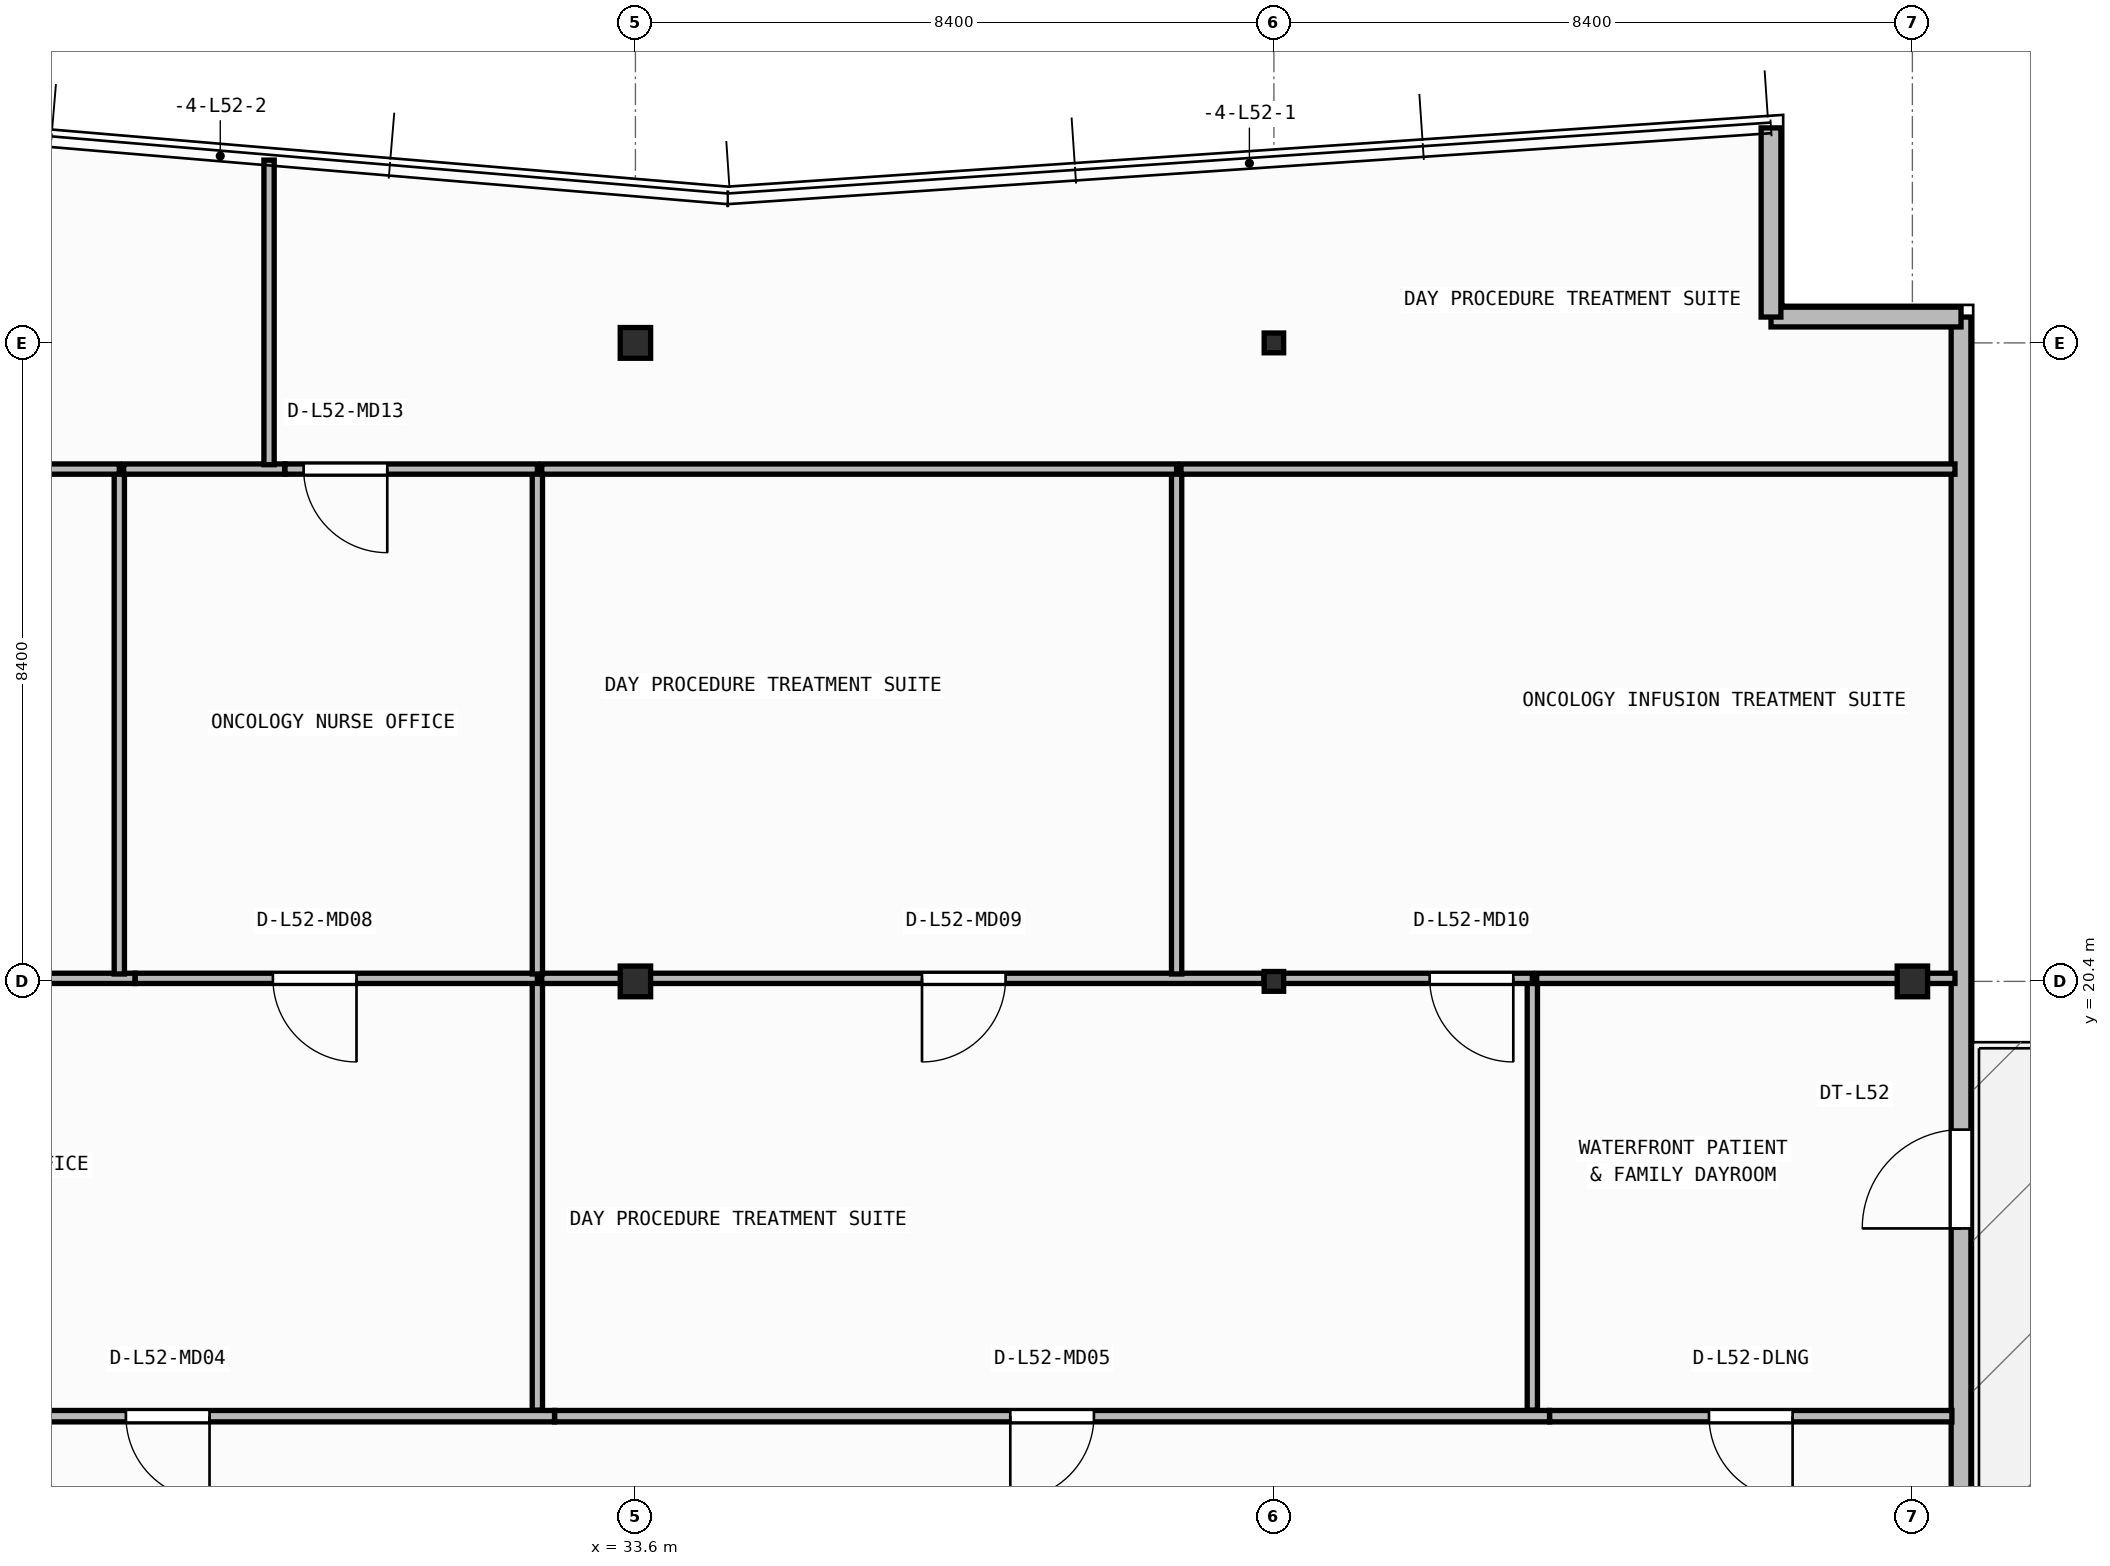
"""IFC4 building model, lengths in metres.
Left out: names, types, materials, properties, quantities, classifications, styles, units other than length and angle.
Written with IfcOpenShell. Run it as: python <this file> out.ifc"""

import sys

from ifc_helpers import new_model, si_unit, direction, frame, frame_2d, origin, origin_2d, place, context, subcontext, project, spatial, rectangle, i_section, extrude, element, fill, save


model = new_model("IFC4")
c1 = context("Model", 3, precision=1e-05, world=origin(), true_north=direction((0.0, 1.0)))
c2 = subcontext(c1, "Body", "Model", "MODEL_VIEW")
j1 = project(units=[si_unit("LENGTHUNIT", "METRE"), si_unit("PLANEANGLEUNIT", "RADIAN")], contexts=[c1])
p1 = place(None, origin())
s1 = spatial("IfcSite", under=j1, at=p1, CompositionType="ELEMENT")
p2 = place(p1, origin())
s2 = spatial("IfcBuilding", under=s1, at=p2, CompositionType="ELEMENT")
p3 = place(p2, frame((0.0, 0.0, 211.85)))
s3 = spatial("IfcBuildingStorey", under=s2, at=p3, CompositionType="ELEMENT", Elevation=211.85)
p4 = place(p3, frame((33.6, 20.4, 0.0), z_axis=(0.0, 0.0, 1.0), x_axis=(1.0, 0.0, 0.0)))
e1 = element("IfcColumn", 1, at=p4, inside=s3, PredefinedType="COLUMN", context=c2, shape_type="SweptSolid", body=[
    extrude(i_section(OverallWidth=0.4, OverallDepth=0.404, WebThickness=0.02, FlangeThickness=0.032, at=origin_2d()), origin(), (0.0, 0.0, 1.0), 3.95),
])
p5 = place(p3, frame((42.0, 20.4, 0.0), z_axis=(0.0, 0.0, 1.0), x_axis=(1.0, 0.0, 0.0)))
e2 = element("IfcColumn", 2, at=p5, inside=s3, PredefinedType="COLUMN", context=c2, shape_type="SweptSolid", body=[
    extrude(i_section(OverallWidth=0.256, OverallDepth=0.26, WebThickness=0.01, FlangeThickness=0.017, FilletRadius=0.013, at=origin_2d()), origin(), (0.0, 0.0, 1.0), 3.95),
])
for number, where, z_axis, x_axis in (
    (3, (50.4, 20.4, 0.0), (0.0, 0.0, 1.0), (1.0, 0.0, 0.0)),
    (4, (33.6, 28.8, 0.0), (0.0, 0.0, 1.0), (1.0, 0.0, 0.0)),
):
    element("IfcColumn", number, at=place(p3, frame(where, z_axis=z_axis, x_axis=x_axis)), inside=s3, PredefinedType="COLUMN", context=c2, shape_type="SweptSolid", body=[
        extrude(i_section(OverallWidth=0.4, OverallDepth=0.404, WebThickness=0.02, FlangeThickness=0.032, at=origin_2d()), origin(), (0.0, 0.0, 1.0), 3.95),
    ])
p6 = place(p3, frame((42.0, 28.8, 0.0), z_axis=(0.0, 0.0, 1.0), x_axis=(1.0, 0.0, 0.0)))
e5 = element("IfcColumn", 5, at=p6, inside=s3, PredefinedType="COLUMN", context=c2, shape_type="SweptSolid", body=[
    extrude(i_section(OverallWidth=0.256, OverallDepth=0.26, WebThickness=0.01, FlangeThickness=0.017, FilletRadius=0.013, at=origin_2d()), origin(), (0.0, 0.0, 1.0), 3.95),
])
p7 = place(p3, frame((51.04, 6.46, 0.0), z_axis=(0.0, 0.0, 1.0), x_axis=(0.0, 1.0, 0.0)))
e6 = element("IfcWall", 6, at=p7, inside=s3, PredefinedType="STANDARD", context=c2, shape_type="SweptSolid", body=[
    extrude(rectangle(XDim=22.68, YDim=0.26, at=frame_2d((11.34, 0.0))), origin(), (0.0, 0.0, 1.0), 3.71),
])
p8 = place(p7, frame((10.69, 0.0, 0.0)))
e7 = element("IfcOpeningElement", 7, at=p8, cuts=e6, PredefinedType="OPENING", context=c2, shape_type="SweptSolid", body=[
    extrude(rectangle(XDim=1.3, YDim=2.15, at=frame_2d((0.65, 1.075))), frame((0.0, 0.14, 0.0), z_axis=(0.0, -1.0, 0.0), x_axis=(1.0, 0.0, 0.0)), (0.0, 0.0, 1.0), 0.28),
])
p9 = place(p3, frame((51.04, 29.14, 0.0), z_axis=(0.0, 0.0, 1.0), x_axis=(-1.0, 0.0, 0.0)))
e8 = element("IfcWall", 8, at=p9, inside=s3, PredefinedType="STANDARD", context=c2, shape_type="SweptSolid", body=[
    extrude(rectangle(XDim=2.5, YDim=0.26, at=frame_2d((1.25, 0.0))), origin(), (0.0, 0.0, 1.0), 3.71),
])
p10 = place(p3, frame((48.54, 29.14, 0.0), z_axis=(0.0, 0.0, 1.0), x_axis=(0.0, 1.0, 0.0)))
e9 = element("IfcWall", 9, at=p10, inside=s3, PredefinedType="STANDARD", context=c2, shape_type="SweptSolid", body=[
    extrude(rectangle(XDim=2.489, YDim=0.26, at=frame_2d((1.245, 0.0))), origin(), (0.0, 0.0, 1.0), 3.71),
])
p11 = place(p3, frame((32.536, 14.68, 0.0), z_axis=(0.0, 0.0, 1.0), x_axis=(-1.0, 0.0, 0.0)))
e10 = element("IfcWall", 10, at=p11, inside=s3, PredefinedType="PARTITIONING", context=c2, shape_type="SweptSolid", body=[
    extrude(rectangle(XDim=10.178, YDim=0.15, at=frame_2d((5.089, 0.0))), origin(), (0.0, 0.0, 1.0), 3.71),
])
p12 = place(p11, frame((4.539, 0.0, 0.0)))
e11 = element("IfcOpeningElement", 11, at=p12, cuts=e10, PredefinedType="OPENING", context=c2, shape_type="SweptSolid", body=[
    extrude(rectangle(XDim=1.1, YDim=2.1, at=frame_2d((0.55, 1.05))), frame((0.0, 0.085, 0.0), z_axis=(0.0, -1.0, 0.0), x_axis=(1.0, 0.0, 0.0)), (0.0, 0.0, 1.0), 0.17),
])
p13 = place(p3, frame((45.626, 14.68, 0.0), z_axis=(0.0, 0.0, 1.0), x_axis=(-1.0, 0.0, 0.0)))
e12 = element("IfcWall", 12, at=p13, inside=s3, PredefinedType="PARTITIONING", context=c2, shape_type="SweptSolid", body=[
    extrude(rectangle(XDim=13.088, YDim=0.15, at=frame_2d((6.544, 0.0))), origin(), (0.0, 0.0, 1.0), 3.71),
])
p14 = place(p13, frame((5.994, 0.0, 0.0)))
e13 = element("IfcOpeningElement", 13, at=p14, cuts=e12, PredefinedType="OPENING", context=c2, shape_type="SweptSolid", body=[
    extrude(rectangle(XDim=1.1, YDim=2.1, at=frame_2d((0.55, 1.05))), frame((0.0, 0.085, 0.0), z_axis=(0.0, -1.0, 0.0), x_axis=(1.0, 0.0, 0.0)), (0.0, 0.0, 1.0), 0.17),
])
p15 = place(p3, frame((50.92, 14.68, 0.0), z_axis=(0.0, 0.0, 1.0), x_axis=(-1.0, 0.0, 0.0)))
e14 = element("IfcWall", 14, at=p15, inside=s3, PredefinedType="PARTITIONING", context=c2, shape_type="SweptSolid", body=[
    extrude(rectangle(XDim=5.292, YDim=0.15, at=frame_2d((2.646, 0.0))), origin(), (0.0, 0.0, 1.0), 3.71),
])
p16 = place(p15, frame((2.096, 0.0, 0.0)))
e15 = element("IfcOpeningElement", 15, at=p16, cuts=e14, PredefinedType="OPENING", context=c2, shape_type="SweptSolid", body=[
    extrude(rectangle(XDim=1.1, YDim=2.1, at=frame_2d((0.55, 1.05))), frame((0.0, 0.085, 0.0), z_axis=(0.0, -1.0, 0.0), x_axis=(1.0, 0.0, 0.0)), (0.0, 0.0, 1.0), 0.17),
])
p17 = place(p3, frame((32.31, 14.76, 0.0), z_axis=(0.0, 0.0, 1.0), x_axis=(0.0, 1.0, 0.0)))
e16 = element("IfcWall", 16, at=p17, inside=s3, PredefinedType="PARTITIONING", context=c2, shape_type="SweptSolid", body=[
    extrude(rectangle(XDim=5.68, YDim=0.135, at=frame_2d((2.84, 0.0))), origin(), (0.0, 0.0, 1.0), 3.71),
])
p18 = place(p3, frame((27.018, 20.44, 0.0), z_axis=(0.0, 0.0, 1.0), x_axis=(-1.0, 0.0, 0.0)))
e17 = element("IfcWall", 17, at=p18, inside=s3, PredefinedType="PARTITIONING", context=c2, shape_type="SweptSolid", body=[
    extrude(rectangle(XDim=4.83, YDim=0.135, at=frame_2d((2.415, 0.0))), origin(), (0.0, 0.0, 1.0), 3.152),
])
p19 = place(p3, frame((32.31, 20.44, 0.0), z_axis=(0.0, 0.0, 1.0), x_axis=(-1.0, 0.0, 0.0)))
e18 = element("IfcWall", 18, at=p19, inside=s3, PredefinedType="PARTITIONING", context=c2, shape_type="SweptSolid", body=[
    extrude(rectangle(XDim=5.291, YDim=0.135, at=frame_2d((2.645, 0.0))), origin(), (0.0, 0.0, 1.0), 3.152),
])
p20 = place(p19, frame((2.379, 0.0, 0.0)))
e19 = element("IfcOpeningElement", 19, at=p20, cuts=e18, PredefinedType="OPENING", context=c2, shape_type="SweptSolid", body=[
    extrude(rectangle(XDim=1.1, YDim=2.1, at=frame_2d((0.55, 1.05))), frame((0.0, 0.077, 0.0), z_axis=(0.0, -1.0, 0.0), x_axis=(1.0, 0.0, 0.0)), (0.0, 0.0, 1.0), 0.155),
])
p21 = place(p3, frame((45.4, 14.76, 0.0), z_axis=(0.0, 0.0, 1.0), x_axis=(0.0, 1.0, 0.0)))
e20 = element("IfcWall", 20, at=p21, inside=s3, PredefinedType="PARTITIONING", context=c2, shape_type="SweptSolid", body=[
    extrude(rectangle(XDim=5.68, YDim=0.135, at=frame_2d((2.84, 0.0))), origin(), (0.0, 0.0, 1.0), 3.71),
])
p22 = place(p3, frame((41.872, 20.44, 0.0), z_axis=(0.0, 0.0, 1.0), x_axis=(-1.0, 0.0, 0.0)))
e21 = element("IfcWall", 21, at=p22, inside=s3, PredefinedType="PARTITIONING", context=c2, shape_type="SweptSolid", body=[
    extrude(rectangle(XDim=9.505, YDim=0.135, at=frame_2d((4.752, 0.0))), origin(), (0.0, 0.0, 1.0), 3.152),
])
p23 = place(p22, frame((3.402, 0.0, 0.0)))
e22 = element("IfcOpeningElement", 22, at=p23, cuts=e21, PredefinedType="OPENING", context=c2, shape_type="SweptSolid", body=[
    extrude(rectangle(XDim=1.1, YDim=2.1, at=frame_2d((0.55, 1.05))), frame((0.0, 0.077, 0.0), z_axis=(0.0, -1.0, 0.0), x_axis=(1.0, 0.0, 0.0)), (0.0, 0.0, 1.0), 0.155),
])
p24 = place(p3, frame((45.4, 20.44, 0.0), z_axis=(0.0, 0.0, 1.0), x_axis=(-1.0, 0.0, 0.0)))
e23 = element("IfcWall", 23, at=p24, inside=s3, PredefinedType="PARTITIONING", context=c2, shape_type="SweptSolid", body=[
    extrude(rectangle(XDim=3.526, YDim=0.135, at=frame_2d((1.763, 0.0))), origin(), (0.0, 0.0, 1.0), 3.152),
])
p25 = place(p24, frame((0.25, 0.0, 0.0)))
e24 = element("IfcOpeningElement", 24, at=p25, cuts=e23, PredefinedType="OPENING", context=c2, shape_type="SweptSolid", body=[
    extrude(rectangle(XDim=1.1, YDim=2.1, at=frame_2d((0.55, 1.05))), frame((0.0, 0.077, 0.0), z_axis=(0.0, -1.0, 0.0), x_axis=(1.0, 0.0, 0.0)), (0.0, 0.0, 1.0), 0.155),
])
p26 = place(p3, frame((50.96, 20.44, 0.0), z_axis=(0.0, 0.0, 1.0), x_axis=(-1.0, 0.0, 0.0)))
e25 = element("IfcWall", 25, at=p26, inside=s3, PredefinedType="PARTITIONING", context=c2, shape_type="SweptSolid", body=[
    extrude(rectangle(XDim=5.502, YDim=0.135, at=frame_2d((2.751, 0.0))), origin(), (0.0, 0.0, 1.0), 3.152),
])
p27 = place(p3, frame((26.81, 20.498, 0.0), z_axis=(0.0, 0.0, 1.0), x_axis=(0.0, 1.0, 0.0)))
e26 = element("IfcWall", 26, at=p27, inside=s3, PredefinedType="PARTITIONING", context=c2, shape_type="SweptSolid", body=[
    extrude(rectangle(XDim=6.642, YDim=0.135, at=frame_2d((3.321, 0.0))), origin(), (0.0, 0.0, 1.0), 3.71),
])
p28 = place(p3, frame((26.81, 27.14, 0.0), z_axis=(0.0, 0.0, 1.0), x_axis=(-1.0, 0.0, 0.0)))
e27 = element("IfcWall", 27, at=p28, inside=s3, PredefinedType="PARTITIONING", context=c2, shape_type="SweptSolid", body=[
    extrude(rectangle(XDim=13.03, YDim=0.135, at=frame_2d((6.515, 0.0))), origin(), (0.0, 0.0, 1.0), 3.71),
])
p29 = place(p28, frame((5.1, 0.0, 0.0)))
e28 = element("IfcOpeningElement", 28, at=p29, cuts=e27, PredefinedType="OPENING", context=c2, shape_type="SweptSolid", body=[
    extrude(rectangle(XDim=1.1, YDim=2.1, at=frame_2d((0.55, 1.05))), frame((0.0, 0.077, 0.0), z_axis=(0.0, -1.0, 0.0), x_axis=(1.0, 0.0, 0.0)), (0.0, 0.0, 1.0), 0.155),
])
p30 = place(p3, frame((32.31, 20.498, 0.0), z_axis=(0.0, 0.0, 1.0), x_axis=(0.0, 1.0, 0.0)))
e29 = element("IfcWall", 29, at=p30, inside=s3, PredefinedType="PARTITIONING", context=c2, shape_type="SweptSolid", body=[
    extrude(rectangle(XDim=6.642, YDim=0.135, at=frame_2d((3.321, 0.0))), origin(), (0.0, 0.0, 1.0), 3.71),
])
p31 = place(p3, frame((28.988, 27.14, 0.0), z_axis=(0.0, 0.0, 1.0), x_axis=(-1.0, 0.0, 0.0)))
e30 = element("IfcWall", 30, at=p31, inside=s3, PredefinedType="PARTITIONING", context=c2, shape_type="SweptSolid", body=[
    extrude(rectangle(XDim=2.12, YDim=0.135, at=frame_2d((1.06, 0.0))), origin(), (0.0, 0.0, 1.0), 3.71),
])
p32 = place(p3, frame((32.31, 27.14, 0.0), z_axis=(0.0, 0.0, 1.0), x_axis=(-1.0, 0.0, 0.0)))
e31 = element("IfcWall", 31, at=p32, inside=s3, PredefinedType="PARTITIONING", context=c2, shape_type="SweptSolid", body=[
    extrude(rectangle(XDim=3.321, YDim=0.135, at=frame_2d((1.66, 0.0))), origin(), (0.0, 0.0, 1.0), 3.71),
])
p33 = place(p32, frame((1.975, 0.0, 0.0)))
e32 = element("IfcOpeningElement", 32, at=p33, cuts=e31, PredefinedType="OPENING", context=c2, shape_type="SweptSolid", body=[
    extrude(rectangle(XDim=1.1, YDim=2.1, at=frame_2d((0.55, 1.05))), frame((0.0, 0.077, 0.0), z_axis=(0.0, -1.0, 0.0), x_axis=(1.0, 0.0, 0.0)), (0.0, 0.0, 1.0), 0.155),
])
p34 = place(p3, frame((40.72, 20.498, 0.0), z_axis=(0.0, 0.0, 1.0), x_axis=(0.0, 1.0, 0.0)))
e33 = element("IfcWall", 33, at=p34, inside=s3, PredefinedType="PARTITIONING", context=c2, shape_type="SweptSolid", body=[
    extrude(rectangle(XDim=6.642, YDim=0.135, at=frame_2d((3.321, 0.0))), origin(), (0.0, 0.0, 1.0), 3.71),
])
p35 = place(p3, frame((40.72, 27.14, 0.0), z_axis=(0.0, 0.0, 1.0), x_axis=(-1.0, 0.0, 0.0)))
e34 = element("IfcWall", 34, at=p35, inside=s3, PredefinedType="PARTITIONING", context=c2, shape_type="SweptSolid", body=[
    extrude(rectangle(XDim=8.353, YDim=0.135, at=frame_2d((4.176, 0.0))), origin(), (0.0, 0.0, 1.0), 3.71),
])
p36 = place(p3, frame((50.96, 27.14, 0.0), z_axis=(0.0, 0.0, 1.0), x_axis=(-1.0, 0.0, 0.0)))
e35 = element("IfcWall", 35, at=p36, inside=s3, PredefinedType="PARTITIONING", context=c2, shape_type="SweptSolid", body=[
    extrude(rectangle(XDim=10.182, YDim=0.135, at=frame_2d((5.091, 0.0))), origin(), (0.0, 0.0, 1.0), 3.71),
])
p37 = place(p3, frame((28.78, 27.198, 0.0), z_axis=(0.0, 0.0, 1.0), x_axis=(0.0, 1.0, 0.0)))
e36 = element("IfcWall", 36, at=p37, inside=s3, PredefinedType="PARTITIONING", context=c2, shape_type="SweptSolid", body=[
    extrude(rectangle(XDim=4.008, YDim=0.135, at=frame_2d((2.004, 0.0))), origin(), (0.0, 0.0, 1.0), 3.71),
])
p38 = place(p8, origin())
e37 = element("IfcDoor", 37, at=p38, inside=s3, OperationType="SINGLE_SWING_LEFT", PredefinedType="DOOR", context=c2, shape_type="SweptSolid", body=[
    extrude(rectangle(XDim=1.3, YDim=2.15, at=frame_2d((0.65, 1.075))), frame((0.0, 0.025, 0.0), z_axis=(0.0, -1.0, 0.0), x_axis=(1.0, 0.0, 0.0)), (0.0, 0.0, 1.0), 0.05),
])
fill(e7, e37)
p39 = place(p12, origin())
e38 = element("IfcDoor", 38, at=p39, inside=s3, OperationType="SINGLE_SWING_LEFT", PredefinedType="DOOR", context=c2, shape_type="SweptSolid", body=[
    extrude(rectangle(XDim=1.1, YDim=2.1, at=frame_2d((0.55, 1.05))), frame((0.0, 0.025, 0.0), z_axis=(0.0, -1.0, 0.0), x_axis=(1.0, 0.0, 0.0)), (0.0, 0.0, 1.0), 0.05),
])
fill(e11, e38)
p40 = place(p14, origin())
e39 = element("IfcDoor", 39, at=p40, inside=s3, OperationType="SINGLE_SWING_RIGHT", PredefinedType="DOOR", context=c2, shape_type="SweptSolid", body=[
    extrude(rectangle(XDim=1.1, YDim=2.1, at=frame_2d((0.55, 1.05))), frame((0.0, 0.025, 0.0), z_axis=(0.0, -1.0, 0.0), x_axis=(1.0, 0.0, 0.0)), (0.0, 0.0, 1.0), 0.05),
])
fill(e13, e39)
p41 = place(p16, origin())
e40 = element("IfcDoor", 40, at=p41, inside=s3, OperationType="SINGLE_SWING_LEFT", PredefinedType="DOOR", context=c2, shape_type="SweptSolid", body=[
    extrude(rectangle(XDim=1.1, YDim=2.1, at=frame_2d((0.55, 1.05))), frame((0.0, 0.025, 0.0), z_axis=(0.0, -1.0, 0.0), x_axis=(1.0, 0.0, 0.0)), (0.0, 0.0, 1.0), 0.05),
])
fill(e15, e40)
p42 = place(p20, origin())
e41 = element("IfcDoor", 41, at=p42, inside=s3, OperationType="SINGLE_SWING_LEFT", PredefinedType="DOOR", context=c2, shape_type="SweptSolid", body=[
    extrude(rectangle(XDim=1.1, YDim=2.1, at=frame_2d((0.55, 1.05))), frame((0.0, 0.025, 0.0), z_axis=(0.0, -1.0, 0.0), x_axis=(1.0, 0.0, 0.0)), (0.0, 0.0, 1.0), 0.05),
])
fill(e19, e41)
p43 = place(p23, origin())
e42 = element("IfcDoor", 42, at=p43, inside=s3, OperationType="SINGLE_SWING_RIGHT", PredefinedType="DOOR", context=c2, shape_type="SweptSolid", body=[
    extrude(rectangle(XDim=1.1, YDim=2.1, at=frame_2d((0.55, 1.05))), frame((0.0, 0.025, 0.0), z_axis=(0.0, -1.0, 0.0), x_axis=(1.0, 0.0, 0.0)), (0.0, 0.0, 1.0), 0.05),
])
fill(e22, e42)
p44 = place(p25, origin())
e43 = element("IfcDoor", 43, at=p44, inside=s3, OperationType="SINGLE_SWING_LEFT", PredefinedType="DOOR", context=c2, shape_type="SweptSolid", body=[
    extrude(rectangle(XDim=1.1, YDim=2.1, at=frame_2d((0.55, 1.05))), frame((0.0, 0.025, 0.0), z_axis=(0.0, -1.0, 0.0), x_axis=(1.0, 0.0, 0.0)), (0.0, 0.0, 1.0), 0.05),
])
fill(e24, e43)
p45 = place(p33, origin())
e44 = element("IfcDoor", 44, at=p45, inside=s3, OperationType="SINGLE_SWING_LEFT", PredefinedType="DOOR", context=c2, shape_type="SweptSolid", body=[
    extrude(rectangle(XDim=1.1, YDim=2.1, at=frame_2d((0.55, 1.05))), frame((0.0, 0.025, 0.0), z_axis=(0.0, -1.0, 0.0), x_axis=(1.0, 0.0, 0.0)), (0.0, 0.0, 1.0), 0.05),
])
fill(e32, e44)
save(model, sys.argv[1])
